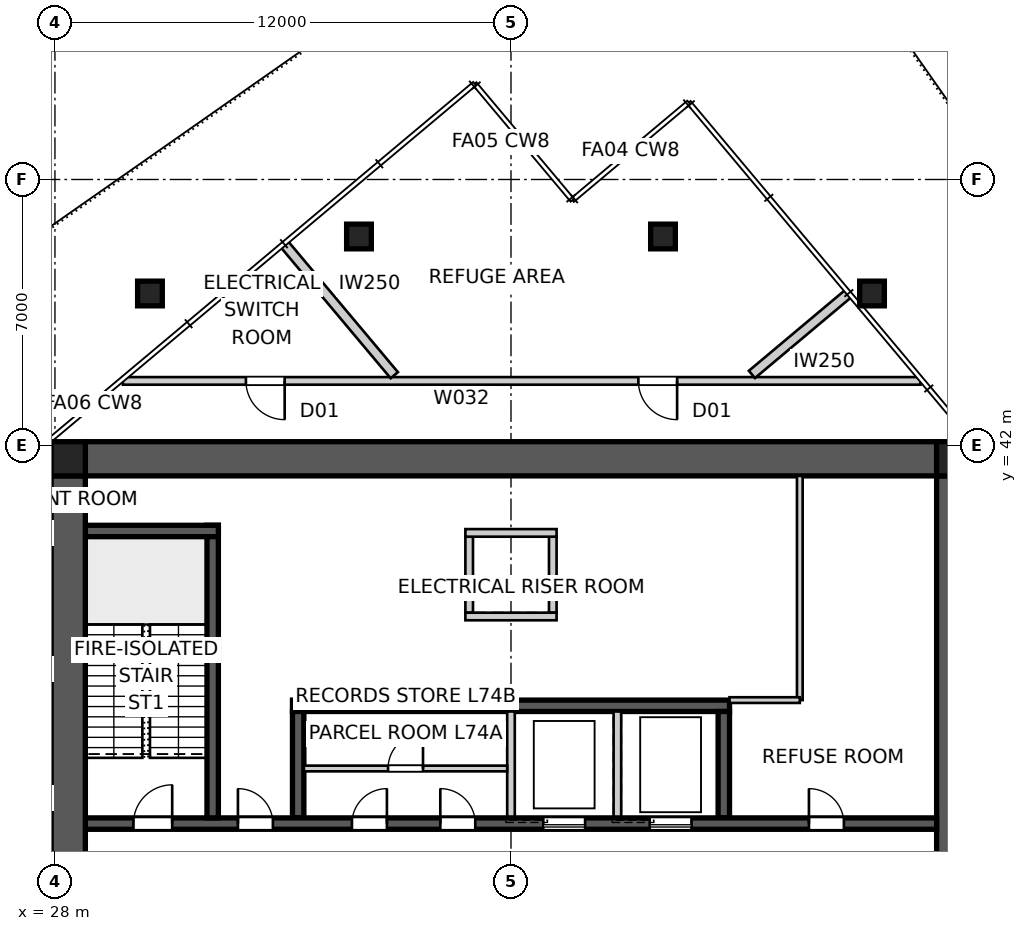
"""IFC4 building model, lengths in metres.
Left out: names, types, materials, properties, quantities, classifications, styles, units other than length and angle.
Written with IfcOpenShell. Run it as: python <this file> out.ifc"""

import sys

from ifc_helpers import new_model, si_unit, direction, frame, frame_2d, origin, origin_2d, place, context, subcontext, project, spatial, polyline, rectangle, outline, extrude, element, fill, save


model = new_model("IFC4")
c1 = context("Model", 3, precision=1e-05, world=origin(), true_north=direction((0.0, 1.0)))
c2 = subcontext(c1, "Body", "Model", "MODEL_VIEW")
j1 = project(units=[si_unit("LENGTHUNIT", "METRE"), si_unit("PLANEANGLEUNIT", "RADIAN")], contexts=[c1])
p1 = place(None, origin())
s1 = spatial("IfcSite", under=j1, at=p1, CompositionType="ELEMENT")
p2 = place(p1, origin())
s2 = spatial("IfcBuilding", under=s1, at=p2, CompositionType="ELEMENT")
p3 = place(p2, frame((0.0, 0.0, 267.6)))
s3 = spatial("IfcBuildingStorey", under=s2, at=p3, CompositionType="ELEMENT", Elevation=267.6)
p4 = place(p3, frame((28.8, 41.65, 0.0), z_axis=(0.0, 0.0, 1.0), x_axis=(1.0, 0.0, 0.0)))
e1 = element("IfcWall", 1, at=p4, inside=s3, PredefinedType="SHEAR", context=c2, shape_type="SweptSolid", body=[
    extrude(outline(polyline([(0.0, -0.45), (22.4, -0.45), (22.4, -0.025), (22.85, -0.025), (22.85, 0.025), (22.4, 0.025), (22.4, 0.45), (0.0, 0.45), (0.0, 0.025), (-0.45, 0.025), (-0.45, -0.025), (0.0, -0.025), (0.0, -0.45)])), origin(), (0.0, 0.0, 1.0), 5.0),
])
p5 = place(p3, frame((51.65, 18.8, 0.0), z_axis=(0.0, 0.0, 1.0), x_axis=(0.0, 1.0, 0.0)))
e2 = element("IfcWall", 2, at=p5, inside=s3, PredefinedType="SHEAR", context=c2, shape_type="SweptSolid", body=[
    extrude(outline(polyline([(0.0, -0.45), (22.4, -0.45), (22.4, -0.025), (22.85, -0.025), (22.85, 0.025), (22.4, 0.025), (22.4, 0.45), (0.0, 0.45), (0.0, 0.025), (-0.45, 0.025), (-0.45, -0.025), (0.0, -0.025), (0.0, -0.45)])), origin(), (0.0, 0.0, 1.0), 5.0),
])
p6 = place(p5, frame((11.14, 0.0, 0.0)))
e3 = element("IfcOpeningElement", 3, at=p6, cuts=e2, PredefinedType="OPENING", context=c2, shape_type="SweptSolid", body=[
    extrude(rectangle(XDim=1.02, YDim=2.4, at=frame_2d((0.51, 1.2))), frame((0.0, 0.46, 0.0), z_axis=(0.0, -1.0, 0.0), x_axis=(1.0, 0.0, 0.0)), (0.0, 0.0, 1.0), 0.92),
])
p7 = place(p3, frame((28.35, 41.2, 0.0), z_axis=(0.0, 0.0, 1.0), x_axis=(0.0, -1.0, 0.0)))
e4 = element("IfcWall", 4, at=p7, inside=s3, PredefinedType="SHEAR", context=c2, shape_type="SweptSolid", body=[
    extrude(outline(polyline([(0.0, -0.45), (22.4, -0.45), (22.4, -0.025), (22.85, -0.025), (22.85, 0.025), (22.4, 0.025), (22.4, 0.45), (0.0, 0.45), (0.0, 0.025), (-0.45, 0.025), (-0.45, -0.025), (0.0, -0.025), (0.0, -0.45)])), origin(), (0.0, 0.0, 1.0), 5.0),
])
p8 = place(p7, frame((11.14, 0.0, 0.0)))
e5 = element("IfcOpeningElement", 5, at=p8, cuts=e4, PredefinedType="OPENING", context=c2, shape_type="SweptSolid", body=[
    extrude(rectangle(XDim=1.02, YDim=2.4, at=frame_2d((0.51, 1.2))), frame((0.0, 0.46, 0.0), z_axis=(0.0, -1.0, 0.0), x_axis=(1.0, 0.0, 0.0)), (0.0, 0.0, 1.0), 0.92),
])
p9 = place(p3, frame((28.8, 32.05, 0.0), z_axis=(0.0, 0.0, 1.0), x_axis=(1.0, 0.0, 0.0)))
e6 = element("IfcWall", 6, at=p9, inside=s3, PredefinedType="SHEAR", context=c2, shape_type="SweptSolid", body=[
    extrude(rectangle(XDim=22.4, YDim=0.3, at=frame_2d((11.2, 0.0))), origin(), (0.0, 0.0, 1.0), 5.0),
])
p10 = place(p9, frame((19.04, 0.0, 0.0)))
e7 = element("IfcOpeningElement", 7, at=p10, cuts=e6, PredefinedType="OPENING", context=c2, shape_type="SweptSolid", body=[
    extrude(rectangle(XDim=0.92, YDim=2.1, at=frame_2d((0.46, 1.05))), frame((0.0, 0.16, 0.0), z_axis=(0.0, -1.0, 0.0), x_axis=(1.0, 0.0, 0.0)), (0.0, 0.0, 1.0), 0.32),
])
p11 = place(p9, frame((1.265, 0.0, 0.0)))
e8 = element("IfcOpeningElement", 8, at=p11, cuts=e6, PredefinedType="OPENING", context=c2, shape_type="SweptSolid", body=[
    extrude(rectangle(XDim=1.02, YDim=2.1, at=frame_2d((0.51, 1.05))), frame((0.0, 0.16, 0.0), z_axis=(0.0, -1.0, 0.0), x_axis=(1.0, 0.0, 0.0)), (0.0, 0.0, 1.0), 0.32),
])
p12 = place(p9, frame((4.015, 0.0, 0.0)))
e9 = element("IfcOpeningElement", 9, at=p12, cuts=e6, PredefinedType="OPENING", context=c2, shape_type="SweptSolid", body=[
    extrude(rectangle(XDim=0.92, YDim=2.1, at=frame_2d((0.46, 1.05))), frame((0.0, 0.16, 0.0), z_axis=(0.0, -1.0, 0.0), x_axis=(1.0, 0.0, 0.0)), (0.0, 0.0, 1.0), 0.32),
])
p13 = place(p9, frame((7.015, 0.0, 0.0)))
e10 = element("IfcOpeningElement", 10, at=p13, cuts=e6, PredefinedType="OPENING", context=c2, shape_type="SweptSolid", body=[
    extrude(rectangle(XDim=0.92, YDim=2.1, at=frame_2d((0.46, 1.05))), frame((0.0, 0.16, 0.0), z_axis=(0.0, -1.0, 0.0), x_axis=(1.0, 0.0, 0.0)), (0.0, 0.0, 1.0), 0.32),
])
p14 = place(p9, frame((9.34, 0.0, 0.0)))
e11 = element("IfcOpeningElement", 11, at=p14, cuts=e6, PredefinedType="OPENING", context=c2, shape_type="SweptSolid", body=[
    extrude(rectangle(XDim=0.92, YDim=2.1, at=frame_2d((0.46, 1.05))), frame((0.0, 0.16, 0.0), z_axis=(0.0, -1.0, 0.0), x_axis=(1.0, 0.0, 0.0)), (0.0, 0.0, 1.0), 0.32),
])
p15 = place(p9, frame((12.05, 0.0, 0.0)))
e12 = element("IfcOpeningElement", 12, at=p15, cuts=e6, PredefinedType="OPENING", context=c2, shape_type="SweptSolid", body=[
    extrude(rectangle(XDim=1.1, YDim=2.1, at=frame_2d((0.55, 1.05))), frame((0.0, 0.16, 0.0), z_axis=(0.0, -1.0, 0.0), x_axis=(1.0, 0.0, 0.0)), (0.0, 0.0, 1.0), 0.32),
])
p16 = place(p9, frame((14.85, 0.0, 0.0)))
e13 = element("IfcOpeningElement", 13, at=p16, cuts=e6, PredefinedType="OPENING", context=c2, shape_type="SweptSolid", body=[
    extrude(rectangle(XDim=1.1, YDim=2.1, at=frame_2d((0.55, 1.05))), frame((0.0, 0.16, 0.0), z_axis=(0.0, -1.0, 0.0), x_axis=(1.0, 0.0, 0.0)), (0.0, 0.0, 1.0), 0.32),
])
p17 = place(p3, frame((34.25, 35.15, 0.0), z_axis=(0.0, 0.0, 1.0), x_axis=(1.0, 0.0, 0.0)))
e14 = element("IfcWall", 14, at=p17, inside=s3, PredefinedType="SHEAR", context=c2, shape_type="SweptSolid", body=[
    extrude(rectangle(XDim=11.5, YDim=0.3, at=frame_2d((5.75, 0.0))), origin(), (0.0, 0.0, 1.0), 5.0),
])
p18 = place(p3, frame((34.4, 32.2, 0.0), z_axis=(0.0, 0.0, 1.0), x_axis=(0.0, 1.0, 0.0)))
e15 = element("IfcWall", 15, at=p18, inside=s3, PredefinedType="SHEAR", context=c2, shape_type="SweptSolid", body=[
    extrude(rectangle(XDim=2.8, YDim=0.3, at=frame_2d((1.4, 0.0))), origin(), (0.0, 0.0, 1.0), 5.0),
])
for number, where, z_axis, x_axis in (
    (16, (40.0, 32.2, 0.0), (0.0, 0.0, 1.0), (0.0, 1.0, 0.0)),
    (17, (42.8, 32.2, 0.0), (0.0, 0.0, 1.0), (0.0, 1.0, 0.0)),
):
    element("IfcWall", number, at=place(p3, frame(where, z_axis=z_axis, x_axis=x_axis)), inside=s3, PredefinedType="SOLIDWALL", context=c2, shape_type="SweptSolid", body=[
        extrude(rectangle(XDim=2.8, YDim=0.2, at=frame_2d((1.4, 0.0))), origin(), (0.0, 0.0, 1.0), 5.0),
    ])
p19 = place(p3, frame((45.6, 32.2, 0.0), z_axis=(0.0, 0.0, 1.0), x_axis=(0.0, 1.0, 0.0)))
e18 = element("IfcWall", 18, at=p19, inside=s3, PredefinedType="SHEAR", context=c2, shape_type="SweptSolid", body=[
    extrude(rectangle(XDim=2.8, YDim=0.3, at=frame_2d((1.4, 0.0))), origin(), (0.0, 0.0, 1.0), 5.0),
])
p20 = place(p3, frame((32.15, 32.2, 0.0), z_axis=(0.0, 0.0, 1.0), x_axis=(0.0, 1.0, 0.0)))
e19 = element("IfcWall", 19, at=p20, inside=s3, PredefinedType="SHEAR", context=c2, shape_type="SweptSolid", body=[
    extrude(rectangle(XDim=7.7, YDim=0.3, at=frame_2d((3.85, 0.0))), origin(), (0.0, 0.0, 1.0), 5.0),
])
p21 = place(p3, frame((28.8, 39.75, 0.0), z_axis=(0.0, 0.0, 1.0), x_axis=(1.0, 0.0, 0.0)))
e20 = element("IfcWall", 20, at=p21, inside=s3, PredefinedType="SHEAR", context=c2, shape_type="SweptSolid", body=[
    extrude(rectangle(XDim=3.5, YDim=0.3, at=frame_2d((1.75, 0.0))), origin(), (0.0, 0.0, 1.0), 5.0),
])
for number, where, z_axis, x_axis in (
    (21, (38.9, 37.6, 0.0), (0.0, 0.0, 1.0), (0.0, 1.0, 0.0)),
    (22, (41.1, 37.6, 0.0), (0.0, 0.0, 1.0), (0.0, 1.0, 0.0)),
):
    element("IfcWall", number, at=place(p3, frame(where, z_axis=z_axis, x_axis=x_axis)), inside=s3, PredefinedType="SOLIDWALL", context=c2, shape_type="SweptSolid", body=[
        extrude(rectangle(XDim=2.0, YDim=0.2, at=frame_2d((1.0, 0.0))), origin(), (0.0, 0.0, 1.0), 5.0),
    ])
for number, where, z_axis, x_axis in (
    (23, (38.8, 37.5, 0.0), (0.0, 0.0, 1.0), (1.0, 0.0, 0.0)),
    (24, (38.8, 39.7, 0.0), (0.0, 0.0, 1.0), (1.0, 0.0, 0.0)),
):
    element("IfcWall", number, at=place(p3, frame(where, z_axis=z_axis, x_axis=x_axis)), inside=s3, PredefinedType="SOLIDWALL", context=c2, shape_type="SweptSolid", body=[
        extrude(rectangle(XDim=2.4, YDim=0.2, at=frame_2d((1.2, 0.0))), origin(), (0.0, 0.0, 1.0), 5.0),
    ])
for number, where, z_axis, x_axis in (
    (25, (51.65, 41.65, 0.0), (0.0, 0.0, 1.0), (1.0, 0.0, 0.0)),
    (26, (28.35, 41.65, 0.0), (0.0, 0.0, 1.0), (1.0, 0.0, 0.0)),
):
    element("IfcColumn", number, at=place(p3, frame(where, z_axis=z_axis, x_axis=x_axis)), inside=s3, PredefinedType="COLUMN", context=c2, shape_type="SweptSolid", body=[
        extrude(rectangle(XDim=0.9, YDim=0.9, at=origin_2d()), origin(), (0.0, 0.0, 1.0), 5.0),
    ])
for number, where, z_axis, x_axis in (
    (27, (49.5, 46.0, 0.0), (0.0, 0.0, 1.0), (1.0, 0.0, 0.0)),
    (28, (44.0, 47.5, 0.0), (0.0, 0.0, 1.0), (1.0, 0.0, 0.0)),
    (29, (36.0, 47.5, 0.0), (0.0, 0.0, 1.0), (1.0, 0.0, 0.0)),
    (30, (30.5, 46.0, 0.0), (0.0, 0.0, 1.0), (1.0, 0.0, 0.0)),
):
    element("IfcColumn", number, at=place(p3, frame(where, z_axis=z_axis, x_axis=x_axis)), inside=s3, PredefinedType="COLUMN", context=c2, shape_type="SweptSolid", body=[
        extrude(rectangle(XDim=0.65, YDim=0.65, at=origin_2d()), origin(), (0.0, 0.0, 1.0), 5.0),
    ])
p22 = place(p3, frame((50.775, 43.7, 0.0), z_axis=(0.0, 0.0, 1.0), x_axis=(-1.0, 0.0, 0.0)))
e31 = element("IfcWall", 31, at=p22, inside=s3, PredefinedType="PARTITIONING", context=c2, shape_type="SweptSolid", body=[
    extrude(rectangle(XDim=20.988, YDim=0.2, at=frame_2d((10.494, 0.0))), origin(), (0.0, 0.0, 1.0), 4.85),
])
p23 = place(p22, frame((6.403, 0.0, 0.0)))
e32 = element("IfcOpeningElement", 32, at=p23, cuts=e31, PredefinedType="OPENING", context=c2, shape_type="SweptSolid", body=[
    extrude(rectangle(XDim=1.02, YDim=2.34, at=frame_2d((0.51, 1.17))), frame((0.0, 0.11, 0.0), z_axis=(0.0, -1.0, 0.0), x_axis=(1.0, 0.0, 0.0)), (0.0, 0.0, 1.0), 0.22),
])
p24 = place(p22, frame((16.729, 0.0, 0.0)))
e33 = element("IfcOpeningElement", 33, at=p24, cuts=e31, PredefinedType="OPENING", context=c2, shape_type="SweptSolid", body=[
    extrude(rectangle(XDim=1.02, YDim=2.34, at=frame_2d((0.51, 1.17))), frame((0.0, 0.11, 0.0), z_axis=(0.0, -1.0, 0.0), x_axis=(1.0, 0.0, 0.0)), (0.0, 0.0, 1.0), 0.22),
])
p25 = place(p3, frame((48.889, 46.009, 0.0), z_axis=(0.0, 0.0, 1.0), x_axis=(-0.766070357753, -0.642756724565, 0.0)))
e34 = element("IfcWall", 34, at=p25, inside=s3, PredefinedType="PARTITIONING", context=c2, shape_type="SweptSolid", body=[
    extrude(rectangle(XDim=3.328, YDim=0.25, at=frame_2d((1.664, 0.0))), origin(), (0.0, 0.0, 1.0), 4.85),
])
p26 = place(p3, frame((34.026, 47.31, 0.0), z_axis=(0.0, 0.0, 1.0), x_axis=(0.642796491962, -0.766036989917, 0.0)))
e35 = element("IfcWall", 35, at=p26, inside=s3, PredefinedType="PARTITIONING", context=c2, shape_type="SweptSolid", body=[
    extrude(rectangle(XDim=4.517, YDim=0.25, at=frame_2d((2.258, 0.0))), origin(), (0.0, 0.0, 1.0), 4.85),
])
p27 = place(p3, frame((47.6, 41.2, 0.0), z_axis=(0.0, 0.0, 1.0), x_axis=(0.0, -1.0, 0.0)))
e36 = element("IfcWall", 36, at=p27, inside=s3, PredefinedType="SOLIDWALL", context=c2, shape_type="SweptSolid", body=[
    extrude(rectangle(XDim=5.9, YDim=0.15, at=frame_2d((2.95, 0.0))), origin(), (0.0, 0.0, 1.0), 4.85),
])
p28 = place(p3, frame((47.6, 35.3, 0.0), z_axis=(0.0, 0.0, 1.0), x_axis=(-1.0, 0.0, 0.0)))
e37 = element("IfcWall", 37, at=p28, inside=s3, PredefinedType="SOLIDWALL", context=c2, shape_type="SweptSolid", body=[
    extrude(rectangle(XDim=1.85, YDim=0.15, at=frame_2d((0.925, 0.0))), origin(), (0.0, 0.0, 1.0), 4.85),
])
p29 = place(p3, frame((34.55, 33.5, 0.0), z_axis=(0.0, 0.0, 1.0), x_axis=(1.0, 0.0, 0.0)))
e38 = element("IfcWall", 38, at=p29, inside=s3, PredefinedType="SOLIDWALL", context=c2, shape_type="SweptSolid", body=[
    extrude(rectangle(XDim=5.35, YDim=0.15, at=frame_2d((2.675, 0.0))), origin(), (0.0, 0.0, 1.0), 4.85),
])
p30 = place(p29, frame((2.215, 0.0, 0.0)))
e39 = element("IfcOpeningElement", 39, at=p30, cuts=e38, PredefinedType="OPENING", context=c2, shape_type="SweptSolid", body=[
    extrude(rectangle(XDim=0.92, YDim=2.1, at=frame_2d((0.46, 1.05))), frame((0.0, 0.085, 0.0), z_axis=(0.0, -1.0, 0.0), x_axis=(1.0, 0.0, 0.0)), (0.0, 0.0, 1.0), 0.17),
])
p31 = place(p10, origin())
e40 = element("IfcDoor", 40, at=p31, inside=s3, OperationType="SINGLE_SWING_LEFT", PredefinedType="DOOR", context=c2, shape_type="SweptSolid", body=[
    extrude(rectangle(XDim=0.92, YDim=2.1, at=frame_2d((0.46, 1.05))), frame((0.0, 0.025, 0.0), z_axis=(0.0, -1.0, 0.0), x_axis=(1.0, 0.0, 0.0)), (0.0, 0.0, 1.0), 0.05),
])
fill(e7, e40)
p32 = place(p11, origin())
e41 = element("IfcDoor", 41, at=p32, inside=s3, OperationType="SINGLE_SWING_RIGHT", PredefinedType="DOOR", context=c2, shape_type="SweptSolid", body=[
    extrude(rectangle(XDim=1.02, YDim=2.1, at=frame_2d((0.51, 1.05))), frame((0.0, 0.025, 0.0), z_axis=(0.0, -1.0, 0.0), x_axis=(1.0, 0.0, 0.0)), (0.0, 0.0, 1.0), 0.05),
])
fill(e8, e41)
p33 = place(p12, origin())
e42 = element("IfcDoor", 42, at=p33, inside=s3, OperationType="SINGLE_SWING_LEFT", PredefinedType="DOOR", context=c2, shape_type="SweptSolid", body=[
    extrude(rectangle(XDim=0.92, YDim=2.1, at=frame_2d((0.46, 1.05))), frame((0.0, 0.025, 0.0), z_axis=(0.0, -1.0, 0.0), x_axis=(1.0, 0.0, 0.0)), (0.0, 0.0, 1.0), 0.05),
])
fill(e9, e42)
p34 = place(p23, origin())
e43 = element("IfcDoor", 43, at=p34, inside=s3, OperationType="SINGLE_SWING_LEFT", PredefinedType="DOOR", context=c2, shape_type="SweptSolid", body=[
    extrude(rectangle(XDim=1.02, YDim=2.34, at=frame_2d((0.51, 1.17))), frame((0.0, 0.025, 0.0), z_axis=(0.0, -1.0, 0.0), x_axis=(1.0, 0.0, 0.0)), (0.0, 0.0, 1.0), 0.05),
])
fill(e32, e43)
p35 = place(p24, origin())
e44 = element("IfcDoor", 44, at=p35, inside=s3, OperationType="SINGLE_SWING_LEFT", PredefinedType="DOOR", context=c2, shape_type="SweptSolid", body=[
    extrude(rectangle(XDim=1.02, YDim=2.34, at=frame_2d((0.51, 1.17))), frame((0.0, 0.025, 0.0), z_axis=(0.0, -1.0, 0.0), x_axis=(1.0, 0.0, 0.0)), (0.0, 0.0, 1.0), 0.05),
])
fill(e33, e44)
p36 = place(p13, origin())
e45 = element("IfcDoor", 45, at=p36, inside=s3, OperationType="SINGLE_SWING_RIGHT", PredefinedType="DOOR", context=c2, shape_type="SweptSolid", body=[
    extrude(rectangle(XDim=0.92, YDim=2.1, at=frame_2d((0.46, 1.05))), frame((0.0, 0.025, 0.0), z_axis=(0.0, -1.0, 0.0), x_axis=(1.0, 0.0, 0.0)), (0.0, 0.0, 1.0), 0.05),
])
fill(e10, e45)
p37 = place(p14, origin())
e46 = element("IfcDoor", 46, at=p37, inside=s3, OperationType="SINGLE_SWING_LEFT", PredefinedType="DOOR", context=c2, shape_type="SweptSolid", body=[
    extrude(rectangle(XDim=0.92, YDim=2.1, at=frame_2d((0.46, 1.05))), frame((0.0, 0.025, 0.0), z_axis=(0.0, -1.0, 0.0), x_axis=(1.0, 0.0, 0.0)), (0.0, 0.0, 1.0), 0.05),
])
fill(e11, e46)
p38 = place(p30, origin())
e47 = element("IfcDoor", 47, at=p38, inside=s3, OperationType="SINGLE_SWING_RIGHT", PredefinedType="DOOR", context=c2, shape_type="SweptSolid", body=[
    extrude(rectangle(XDim=0.92, YDim=2.1, at=frame_2d((0.46, 1.05))), frame((0.0, 0.025, 0.0), z_axis=(0.0, -1.0, 0.0), x_axis=(1.0, 0.0, 0.0)), (0.0, 0.0, 1.0), 0.05),
])
fill(e39, e47)
p39 = place(p15, origin())
e48 = element("IfcDoor", 48, at=p39, inside=s3, OperationType="SLIDING_TO_LEFT", PredefinedType="DOOR", context=c2, shape_type="SweptSolid", body=[
    extrude(rectangle(XDim=1.1, YDim=2.1, at=frame_2d((0.55, 1.05))), frame((0.0, 0.025, 0.0), z_axis=(0.0, -1.0, 0.0), x_axis=(1.0, 0.0, 0.0)), (0.0, 0.0, 1.0), 0.05),
])
fill(e12, e48)
p40 = place(p16, origin())
e49 = element("IfcDoor", 49, at=p40, inside=s3, OperationType="SLIDING_TO_LEFT", PredefinedType="DOOR", context=c2, shape_type="SweptSolid", body=[
    extrude(rectangle(XDim=1.1, YDim=2.1, at=frame_2d((0.55, 1.05))), frame((0.0, 0.025, 0.0), z_axis=(0.0, -1.0, 0.0), x_axis=(1.0, 0.0, 0.0)), (0.0, 0.0, 1.0), 0.05),
])
fill(e13, e49)
save(model, sys.argv[1])
